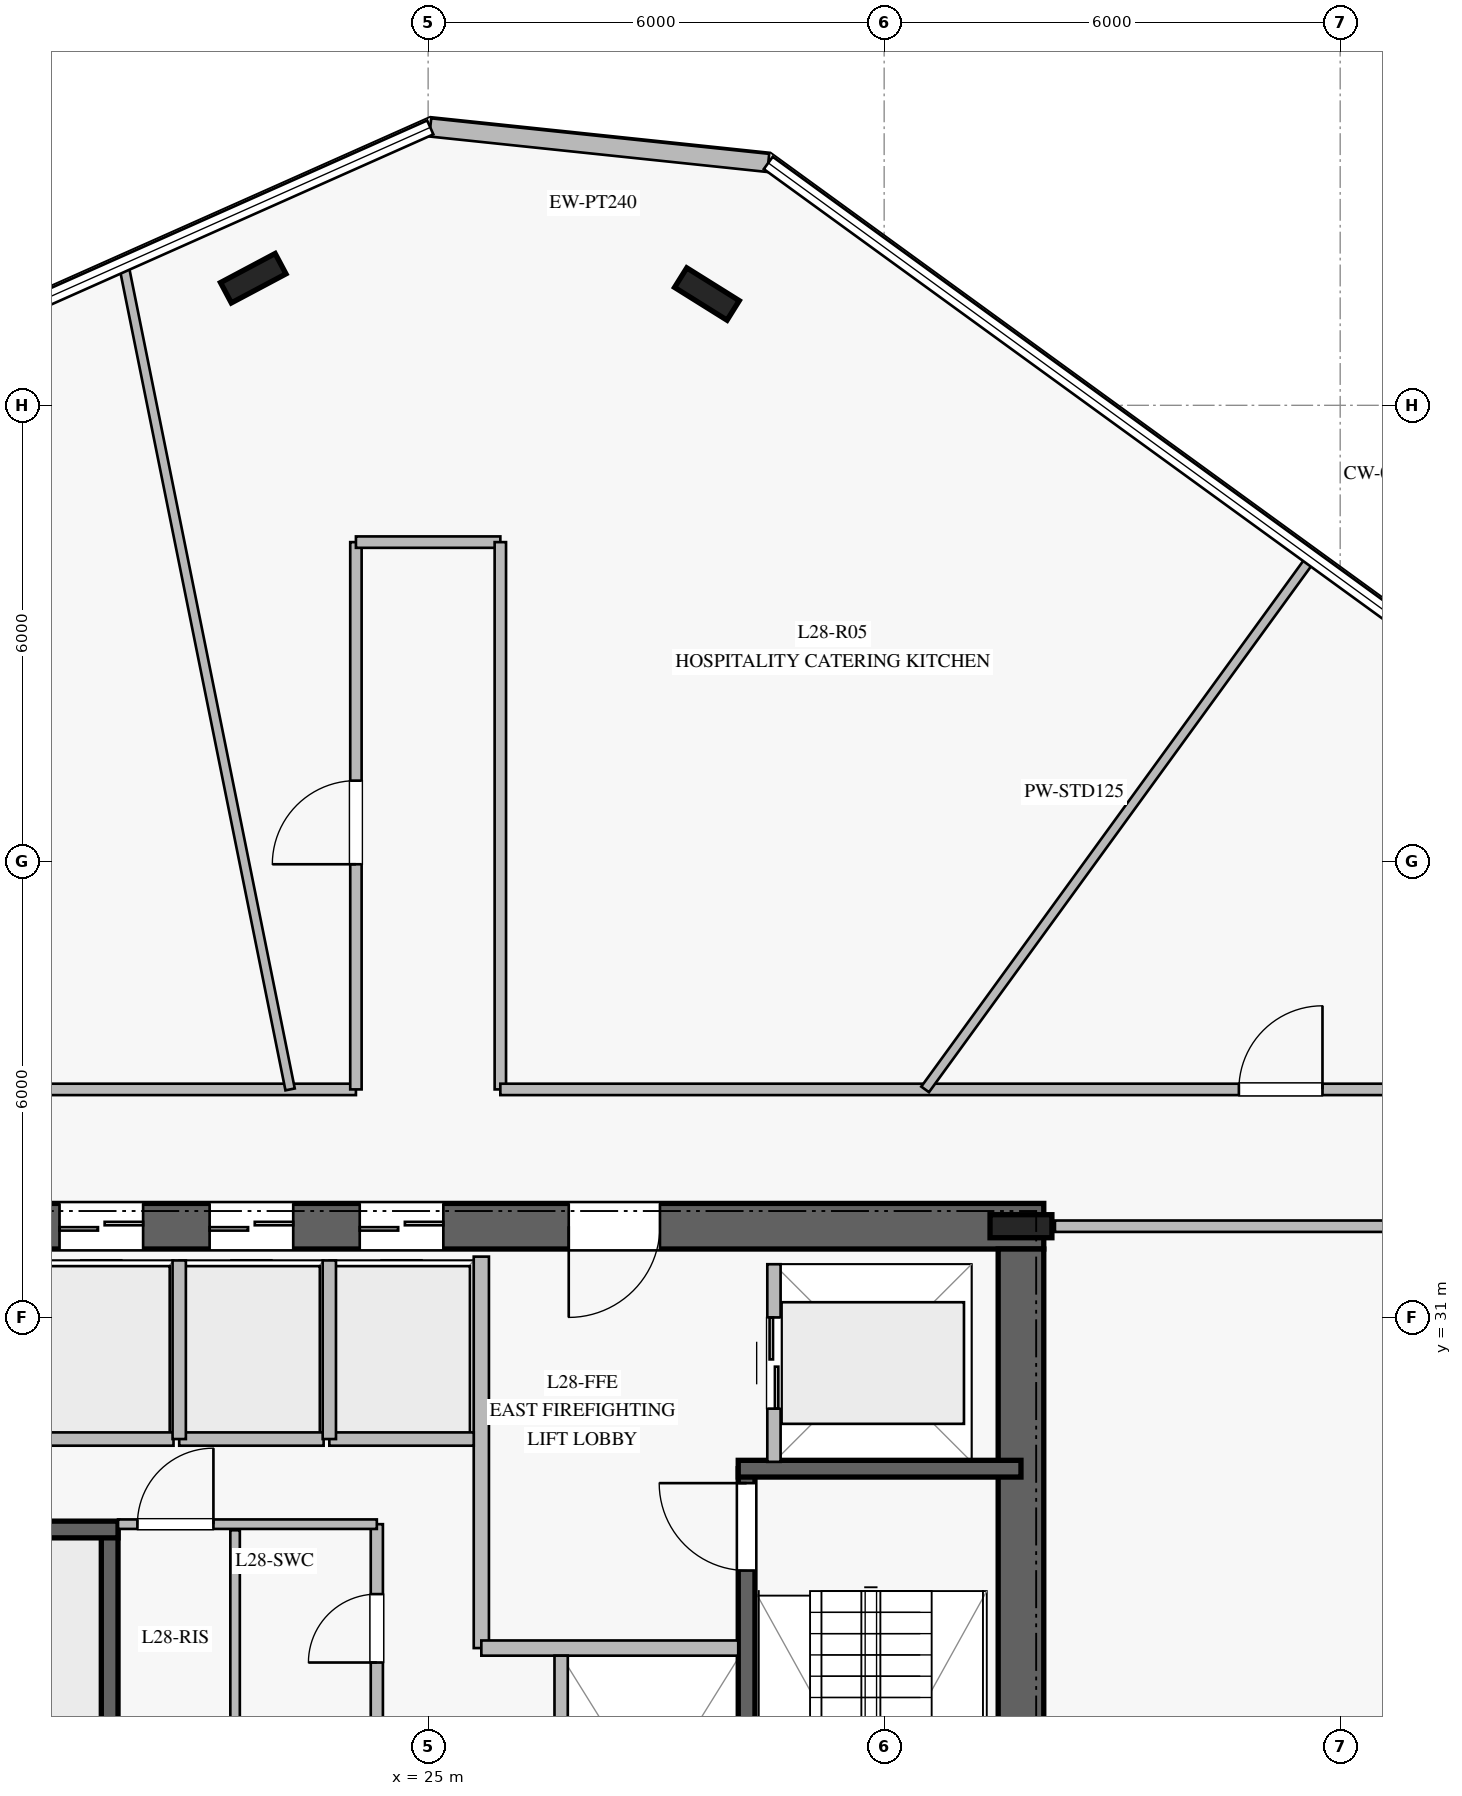
"""IFC4 building model, lengths in metres.
Left out: names, types, materials, properties, quantities, classifications, styles, units other than length and angle.
Written with IfcOpenShell. Run it as: python <this file> out.ifc"""

import sys

from ifc_helpers import new_model, si_unit, direction, frame, frame_2d, origin, origin_2d, place, context, subcontext, project, spatial, rectangle, i_section, extrude, element, fill, save


model = new_model("IFC4")
c1 = context("Model", 3, precision=1e-05, world=origin(), true_north=direction((0.0, 1.0)))
c2 = subcontext(c1, "Body", "Model", "MODEL_VIEW")
j1 = project(units=[si_unit("LENGTHUNIT", "METRE"), si_unit("PLANEANGLEUNIT", "RADIAN")], contexts=[c1])
p1 = place(None, origin())
s1 = spatial("IfcSite", under=j1, at=p1, CompositionType="ELEMENT")
p2 = place(p1, origin())
s2 = spatial("IfcBuilding", under=s1, at=p2, CompositionType="ELEMENT")
p3 = place(p2, frame((0.0, 0.0, 118.4)))
s3 = spatial("IfcBuildingStorey", under=s2, at=p3, CompositionType="ELEMENT", Elevation=118.4)
p4 = place(p3, frame((33.1, 32.2, 0.0), z_axis=(0.0, 0.0, 1.0), x_axis=(-1.0, 0.0, 0.0)))
e1 = element("IfcWall", 1, at=p4, inside=s3, PredefinedType="SHEAR", context=c2, shape_type="SweptSolid", body=[
    extrude(rectangle(XDim=16.2, YDim=0.6, at=frame_2d((8.1, 0.0))), origin(), (0.0, 0.0, 1.0), 3.76),
])
p5 = place(p4, frame((5.05, 0.0, 0.0)))
e2 = element("IfcOpeningElement", 2, at=p5, cuts=e1, PredefinedType="OPENING", context=c2, shape_type="SweptSolid", body=[
    extrude(rectangle(XDim=1.2, YDim=2.25, at=frame_2d((0.6, 1.125))), frame((0.0, 0.31, 0.0), z_axis=(0.0, -1.0, 0.0), x_axis=(1.0, 0.0, 0.0)), (0.0, 0.0, 1.0), 0.62),
])
p6 = place(p4, frame((11.85, 0.0, 0.0)))
e3 = element("IfcOpeningElement", 3, at=p6, cuts=e1, PredefinedType="OPENING", context=c2, shape_type="SweptSolid", body=[
    extrude(rectangle(XDim=1.1, YDim=2.2, at=frame_2d((0.55, 1.1))), frame((0.0, 0.31, 0.0), z_axis=(0.0, -1.0, 0.0), x_axis=(1.0, 0.0, 0.0)), (0.0, 0.0, 1.0), 0.62),
])
p7 = place(p4, frame((9.875, 0.0, 0.0)))
e4 = element("IfcOpeningElement", 4, at=p7, cuts=e1, PredefinedType="OPENING", context=c2, shape_type="SweptSolid", body=[
    extrude(rectangle(XDim=1.1, YDim=2.2, at=frame_2d((0.55, 1.1))), frame((0.0, 0.31, 0.0), z_axis=(0.0, -1.0, 0.0), x_axis=(1.0, 0.0, 0.0)), (0.0, 0.0, 1.0), 0.62),
])
p8 = place(p4, frame((7.9, 0.0, 0.0)))
e5 = element("IfcOpeningElement", 5, at=p8, cuts=e1, PredefinedType="OPENING", context=c2, shape_type="SweptSolid", body=[
    extrude(rectangle(XDim=1.1, YDim=2.2, at=frame_2d((0.55, 1.1))), frame((0.0, 0.31, 0.0), z_axis=(0.0, -1.0, 0.0), x_axis=(1.0, 0.0, 0.0)), (0.0, 0.0, 1.0), 0.62),
])
p9 = place(p3, frame((32.8, 18.1, 0.0), z_axis=(0.0, 0.0, 1.0), x_axis=(0.0, 1.0, 0.0)))
e6 = element("IfcWall", 6, at=p9, inside=s3, PredefinedType="SHEAR", context=c2, shape_type="SweptSolid", body=[
    extrude(rectangle(XDim=13.8, YDim=0.6, at=frame_2d((6.9, 0.0))), origin(), (0.0, 0.0, 1.0), 3.76),
])
p10 = place(p3, frame((32.8, 32.2, 0.0), z_axis=(0.0, 0.0, 1.0), x_axis=(1.0, 0.0, 0.0)))
e7 = element("IfcColumn", 7, at=p10, inside=s3, PredefinedType="COLUMN", context=c2, shape_type="SweptSolid", body=[
    extrude(i_section(OverallWidth=0.303, OverallDepth=0.814, WebThickness=0.021, FlangeThickness=0.04, at=origin_2d()), origin(), (0.0, 0.0, 1.0), 4.0),
])
p11 = place(p3, frame((20.81, 20.99, 0.0), z_axis=(0.0, 0.0, 1.0), x_axis=(0.0, 1.0, 0.0)))
e8 = element("IfcWall", 8, at=p11, inside=s3, PredefinedType="SOLIDWALL", context=c2, shape_type="SweptSolid", body=[
    extrude(rectangle(XDim=7.22, YDim=0.22, at=frame_2d((3.61, 0.0))), origin(), (0.0, 0.0, 1.0), 3.76),
])
p12 = place(p11, frame((0.18, 0.0, 0.0)))
e9 = element("IfcOpeningElement", 9, at=p12, cuts=e8, PredefinedType="OPENING", context=c2, shape_type="SweptSolid", body=[
    extrude(rectangle(XDim=1.15, YDim=2.2, at=frame_2d((0.575, 1.1))), frame((0.0, 0.12, 0.0), z_axis=(0.0, -1.0, 0.0), x_axis=(1.0, 0.0, 0.0)), (0.0, 0.0, 1.0), 0.24),
])
p13 = place(p3, frame((17.2, 28.21, 0.0), z_axis=(0.0, 0.0, 1.0), x_axis=(1.0, 0.0, 0.0)))
e10 = element("IfcWall", 10, at=p13, inside=s3, PredefinedType="SOLIDWALL", context=c2, shape_type="SweptSolid", body=[
    extrude(rectangle(XDim=3.72, YDim=0.22, at=frame_2d((1.86, 0.0))), origin(), (0.0, 0.0, 1.0), 3.76),
])
p14 = place(p3, frame((29.19, 21.79, 0.0), z_axis=(0.0, 0.0, 1.0), x_axis=(0.0, 1.0, 0.0)))
e11 = element("IfcWall", 11, at=p14, inside=s3, PredefinedType="SOLIDWALL", context=c2, shape_type="SweptSolid", body=[
    extrude(rectangle(XDim=7.22, YDim=0.22, at=frame_2d((3.61, 0.0))), origin(), (0.0, 0.0, 1.0), 3.76),
])
p15 = place(p14, frame((5.88, 0.0, 0.0)))
e12 = element("IfcOpeningElement", 12, at=p15, cuts=e11, PredefinedType="OPENING", context=c2, shape_type="SweptSolid", body=[
    extrude(rectangle(XDim=1.15, YDim=2.2, at=frame_2d((0.575, 1.1))), frame((0.0, 0.12, 0.0), z_axis=(0.0, -1.0, 0.0), x_axis=(1.0, 0.0, 0.0)), (0.0, 0.0, 1.0), 0.24),
])
p16 = place(p3, frame((29.08, 29.01, 0.0), z_axis=(0.0, 0.0, 1.0), x_axis=(1.0, 0.0, 0.0)))
e13 = element("IfcWall", 13, at=p16, inside=s3, PredefinedType="SOLIDWALL", context=c2, shape_type="SweptSolid", body=[
    extrude(rectangle(XDim=3.72, YDim=0.22, at=frame_2d((1.86, 0.0))), origin(), (0.0, 0.0, 1.0), 3.76),
])
for number, where, z_axis, x_axis in (
    (14, (28.668, 44.464, 0.0), (0.0, 0.0, 1.0), (-0.848, 0.53, 0.0)),
    (15, (22.699, 44.672, 0.0), (0.0, 0.0, 1.0), (0.883, 0.469, 0.0)),
):
    element("IfcColumn", number, at=place(p3, frame(where, z_axis=z_axis, x_axis=x_axis)), inside=s3, PredefinedType="COLUMN", context=c2, shape_type="SweptSolid", body=[
        extrude(i_section(OverallWidth=0.303, OverallDepth=0.814, WebThickness=0.021, FlangeThickness=0.04, at=origin_2d()), origin(), (0.0, 0.0, 1.0), 4.0),
    ])
p17 = place(p3, frame((29.475, 46.189, 0.0), z_axis=(0.0, 0.0, 1.0), x_axis=(-0.994530256506, 0.104448881729, 0.0)))
e16 = element("IfcWall", 16, at=p17, inside=s3, PredefinedType="STANDARD", context=c2, shape_type="SweptSolid", body=[
    extrude(rectangle(XDim=4.471, YDim=0.24, at=frame_2d((2.236, 0.0))), origin(), (0.0, 0.0, 1.0), 3.76),
])
p18 = place(p3, frame((25.7, 26.65, 0.0), z_axis=(0.0, 0.0, 1.0), x_axis=(0.0, 1.0, 0.0)))
e17 = element("IfcWall", 17, at=p18, inside=s3, PredefinedType="PARTITIONING", context=c2, shape_type="SweptSolid", body=[
    extrude(rectangle(XDim=5.15, YDim=0.2, at=frame_2d((2.575, 0.0))), origin(), (0.0, 0.0, 1.0), 3.76),
])
p19 = place(p3, frame((25.7, 26.65, 0.0), z_axis=(0.0, 0.0, 1.0), x_axis=(1.0, 0.0, 0.0)))
e18 = element("IfcWall", 18, at=p19, inside=s3, PredefinedType="PARTITIONING", context=c2, shape_type="SweptSolid", body=[
    extrude(rectangle(XDim=3.38, YDim=0.2, at=frame_2d((1.69, 0.0))), origin(), (0.0, 0.0, 1.0), 3.76),
])
p20 = place(p3, frame((24.325, 23.35, 0.0), z_axis=(0.0, 0.0, 1.0), x_axis=(0.0, 1.0, 0.0)))
e19 = element("IfcWall", 19, at=p20, inside=s3, PredefinedType="PLUMBINGWALL", context=c2, shape_type="SweptSolid", body=[
    extrude(rectangle(XDim=4.93, YDim=0.16, at=frame_2d((2.465, 0.0))), origin(), (0.0, 0.0, 1.0), 3.76),
])
p21 = place(p20, frame((0.65, 0.0, 0.0)))
e20 = element("IfcOpeningElement", 20, at=p21, cuts=e19, PredefinedType="OPENING", context=c2, shape_type="SweptSolid", body=[
    extrude(rectangle(XDim=0.95, YDim=2.1, at=frame_2d((0.475, 1.05))), frame((0.0, 0.09, 0.0), z_axis=(0.0, -1.0, 0.0), x_axis=(1.0, 0.0, 0.0)), (0.0, 0.0, 1.0), 0.18),
])
p22 = place(p20, frame((3.11, 0.0, 0.0)))
e21 = element("IfcOpeningElement", 21, at=p22, cuts=e19, PredefinedType="OPENING", context=c2, shape_type="SweptSolid", body=[
    extrude(rectangle(XDim=0.9, YDim=2.1, at=frame_2d((0.45, 1.05))), frame((0.0, 0.09, 0.0), z_axis=(0.0, -1.0, 0.0), x_axis=(1.0, 0.0, 0.0)), (0.0, 0.0, 1.0), 0.18),
])
p23 = place(p3, frame((20.92, 28.28, 0.0), z_axis=(0.0, 0.0, 1.0), x_axis=(1.0, 0.0, 0.0)))
e22 = element("IfcWall", 22, at=p23, inside=s3, PredefinedType="PARTITIONING", context=c2, shape_type="SweptSolid", body=[
    extrude(rectangle(XDim=3.405, YDim=0.125, at=frame_2d((1.703, 0.0))), origin(), (0.0, 0.0, 1.0), 3.76),
])
p24 = place(p23, frame((0.255, 0.0, 0.0)))
e23 = element("IfcOpeningElement", 23, at=p24, cuts=e22, PredefinedType="OPENING", context=c2, shape_type="SweptSolid", body=[
    extrude(rectangle(XDim=1.0, YDim=2.15, at=frame_2d((0.5, 1.075))), frame((0.0, 0.073, 0.0), z_axis=(0.0, -1.0, 0.0), x_axis=(1.0, 0.0, 0.0)), (0.0, 0.0, 1.0), 0.145),
])
p25 = place(p3, frame((22.46, 25.62, 0.0), z_axis=(0.0, 0.0, 1.0), x_axis=(0.0, 1.0, 0.0)))
e24 = element("IfcWall", 24, at=p25, inside=s3, PredefinedType="PARTITIONING", context=c2, shape_type="SweptSolid", body=[
    extrude(rectangle(XDim=2.58, YDim=0.125, at=frame_2d((1.29, 0.0))), origin(), (0.0, 0.0, 1.0), 3.76),
])
for number, where, z_axis, x_axis in (
    (25, (19.75, 29.4, 0.0), (0.0, 0.0, 1.0), (1.0, 0.0, 0.0)),
    (26, (21.725, 29.4, 0.0), (0.0, 0.0, 1.0), (1.0, 0.0, 0.0)),
):
    element("IfcWall", number, at=place(p3, frame(where, z_axis=z_axis, x_axis=x_axis)), inside=s3, PredefinedType="PARTITIONING", context=c2, shape_type="SweptSolid", body=[
        extrude(rectangle(XDim=1.9, YDim=0.175, at=frame_2d((0.95, 0.0))), origin(), (0.0, 0.0, 1.0), 3.76),
    ])
p26 = place(p3, frame((21.725, 29.4, 0.0), z_axis=(0.0, 0.0, 1.0), x_axis=(0.0, 1.0, 0.0)))
e27 = element("IfcWall", 27, at=p26, inside=s3, PredefinedType="PARTITIONING", context=c2, shape_type="SweptSolid", body=[
    extrude(rectangle(XDim=2.35, YDim=0.175, at=frame_2d((1.175, 0.0))), origin(), (0.0, 0.0, 1.0), 3.76),
])
p27 = place(p3, frame((23.7, 29.4, 0.0), z_axis=(0.0, 0.0, 1.0), x_axis=(1.0, 0.0, 0.0)))
e28 = element("IfcWall", 28, at=p27, inside=s3, PredefinedType="PARTITIONING", context=c2, shape_type="SweptSolid", body=[
    extrude(rectangle(XDim=1.9, YDim=0.175, at=frame_2d((0.95, 0.0))), origin(), (0.0, 0.0, 1.0), 3.76),
])
p28 = place(p3, frame((23.7, 29.4, 0.0), z_axis=(0.0, 0.0, 1.0), x_axis=(0.0, 1.0, 0.0)))
e29 = element("IfcWall", 29, at=p28, inside=s3, PredefinedType="PARTITIONING", context=c2, shape_type="SweptSolid", body=[
    extrude(rectangle(XDim=2.35, YDim=0.175, at=frame_2d((1.175, 0.0))), origin(), (0.0, 0.0, 1.0), 3.76),
])
p29 = place(p3, frame((26.75, 24.65, 0.0), z_axis=(0.0, 0.0, 1.0), x_axis=(0.0, 1.0, 0.0)))
e30 = element("IfcWall", 30, at=p29, inside=s3, PredefinedType="PARTITIONING", context=c2, shape_type="SweptSolid", body=[
    extrude(rectangle(XDim=1.9, YDim=0.175, at=frame_2d((0.95, 0.0))), origin(), (0.0, 0.0, 1.0), 3.76),
])
p30 = place(p3, frame((29.55, 29.1, 0.0), z_axis=(0.0, 0.0, 1.0), x_axis=(0.0, 1.0, 0.0)))
e31 = element("IfcWall", 31, at=p30, inside=s3, PredefinedType="PARTITIONING", context=c2, shape_type="SweptSolid", body=[
    extrude(rectangle(XDim=2.6, YDim=0.175, at=frame_2d((1.3, 0.0))), origin(), (0.0, 0.0, 1.0), 3.76),
])
p31 = place(p30, frame((0.7, 0.0, 0.0)))
e32 = element("IfcOpeningElement", 32, at=p31, cuts=e31, PredefinedType="OPENING", context=c2, shape_type="SweptSolid", body=[
    extrude(rectangle(XDim=1.2, YDim=2.2, at=frame_2d((0.6, 1.1))), frame((0.0, 0.098, 0.0), z_axis=(0.0, -1.0, 0.0), x_axis=(1.0, 0.0, 0.0)), (0.0, 0.0, 1.0), 0.195),
])
p32 = place(p3, frame((17.2, 34.0, 0.0), z_axis=(0.0, 0.0, 1.0), x_axis=(1.0, 0.0, 0.0)))
e33 = element("IfcWall", 33, at=p32, inside=s3, PredefinedType="PARTITIONING", context=c2, shape_type="SweptSolid", body=[
    extrude(rectangle(XDim=6.85, YDim=0.15, at=frame_2d((3.425, 0.0))), origin(), (0.0, 0.0, 1.0), 3.21),
])
p33 = place(p3, frame((24.05, 34.0, 0.0), z_axis=(0.0, 0.0, 1.0), x_axis=(0.0, 1.0, 0.0)))
e34 = element("IfcWall", 34, at=p33, inside=s3, PredefinedType="PARTITIONING", context=c2, shape_type="SweptSolid", body=[
    extrude(rectangle(XDim=7.2, YDim=0.15, at=frame_2d((3.6, 0.0))), origin(), (0.0, 0.0, 1.0), 3.36),
])
p34 = place(p33, frame((2.962, 0.0, 0.0)))
e35 = element("IfcOpeningElement", 35, at=p34, cuts=e34, PredefinedType="OPENING", context=c2, shape_type="SweptSolid", body=[
    extrude(rectangle(XDim=1.1, YDim=2.2, at=frame_2d((0.55, 1.1))), frame((0.0, 0.085, 0.0), z_axis=(0.0, -1.0, 0.0), x_axis=(1.0, 0.0, 0.0)), (0.0, 0.0, 1.0), 0.17),
])
p35 = place(p3, frame((24.05, 41.2, 0.0), z_axis=(0.0, 0.0, 1.0), x_axis=(1.0, 0.0, 0.0)))
e36 = element("IfcWall", 36, at=p35, inside=s3, PredefinedType="PARTITIONING", context=c2, shape_type="SweptSolid", body=[
    extrude(rectangle(XDim=1.9, YDim=0.15, at=frame_2d((0.95, 0.0))), origin(), (0.0, 0.0, 1.0), 3.76),
])
p36 = place(p3, frame((25.95, 41.2, 0.0), z_axis=(0.0, 0.0, 1.0), x_axis=(0.0, -1.0, 0.0)))
e37 = element("IfcWall", 37, at=p36, inside=s3, PredefinedType="PARTITIONING", context=c2, shape_type="SweptSolid", body=[
    extrude(rectangle(XDim=7.2, YDim=0.15, at=frame_2d((3.6, 0.0))), origin(), (0.0, 0.0, 1.0), 3.36),
])
p37 = place(p3, frame((25.95, 34.0, 0.0), z_axis=(0.0, 0.0, 1.0), x_axis=(1.0, 0.0, 0.0)))
e38 = element("IfcWall", 38, at=p37, inside=s3, PredefinedType="PARTITIONING", context=c2, shape_type="SweptSolid", body=[
    extrude(rectangle(XDim=15.25, YDim=0.15, at=frame_2d((7.625, 0.0))), origin(), (0.0, 0.0, 1.0), 3.21),
])
p38 = place(p37, frame((9.717, 0.0, 0.0)))
e39 = element("IfcOpeningElement", 39, at=p38, cuts=e38, PredefinedType="OPENING", context=c2, shape_type="SweptSolid", body=[
    extrude(rectangle(XDim=1.1, YDim=2.2, at=frame_2d((0.55, 1.1))), frame((0.0, 0.085, 0.0), z_axis=(0.0, -1.0, 0.0), x_axis=(1.0, 0.0, 0.0)), (0.0, 0.0, 1.0), 0.17),
])
p39 = place(p3, frame((41.2, 32.2, 0.0), z_axis=(0.0, 0.0, 1.0), x_axis=(-1.0, 0.0, 0.0)))
e40 = element("IfcWall", 40, at=p39, inside=s3, PredefinedType="PARTITIONING", context=c2, shape_type="SweptSolid", body=[
    extrude(rectangle(XDim=7.953, YDim=0.15, at=frame_2d((3.977, 0.0))), origin(), (0.0, 0.0, 1.0), 3.21),
])
p40 = place(p3, frame((31.539, 34.0, 0.0), z_axis=(0.0, 0.0, 1.0), x_axis=(0.587810002797, 0.808999011502, 0.0)))
e41 = element("IfcWall", 41, at=p40, inside=s3, PredefinedType="PARTITIONING", context=c2, shape_type="SweptSolid", body=[
    extrude(rectangle(XDim=8.63, YDim=0.125, at=frame_2d((4.315, 0.0))), origin(), (0.0, 0.0, 1.0), 3.05),
])
p41 = place(p3, frame((23.184, 34.0, 0.0), z_axis=(0.0, 0.0, 1.0), x_axis=(-0.197818005652, 0.980238765118, 0.0)))
e42 = element("IfcWall", 42, at=p41, inside=s3, PredefinedType="PARTITIONING", context=c2, shape_type="SweptSolid", body=[
    extrude(rectangle(XDim=11.061, YDim=0.125, at=frame_2d((5.53, 0.0))), origin(), (0.0, 0.0, 1.0), 3.16),
])
p42 = place(p15, origin())
e43 = element("IfcDoor", 43, at=p42, inside=s3, OperationType="SINGLE_SWING_RIGHT", PredefinedType="DOOR", context=c2, shape_type="SweptSolid", body=[
    extrude(rectangle(XDim=1.15, YDim=2.2, at=frame_2d((0.575, 1.1))), frame((0.0, 0.025, 0.0), z_axis=(0.0, -1.0, 0.0), x_axis=(1.0, 0.0, 0.0)), (0.0, 0.0, 1.0), 0.05),
])
fill(e12, e43)
p43 = place(p5, origin())
e44 = element("IfcDoor", 44, at=p43, inside=s3, OperationType="SINGLE_SWING_RIGHT", PredefinedType="DOOR", context=c2, shape_type="SweptSolid", body=[
    extrude(rectangle(XDim=1.2, YDim=2.25, at=frame_2d((0.6, 1.125))), frame((0.0, 0.025, 0.0), z_axis=(0.0, -1.0, 0.0), x_axis=(1.0, 0.0, 0.0)), (0.0, 0.0, 1.0), 0.05),
])
fill(e2, e44)
p44 = place(p24, origin())
e45 = element("IfcDoor", 45, at=p44, inside=s3, OperationType="SINGLE_SWING_RIGHT", PredefinedType="DOOR", context=c2, shape_type="SweptSolid", body=[
    extrude(rectangle(XDim=1.0, YDim=2.15, at=frame_2d((0.5, 1.075))), frame((0.0, 0.025, 0.0), z_axis=(0.0, -1.0, 0.0), x_axis=(1.0, 0.0, 0.0)), (0.0, 0.0, 1.0), 0.05),
])
fill(e23, e45)
p45 = place(p22, origin())
e46 = element("IfcDoor", 46, at=p45, inside=s3, OperationType="SINGLE_SWING_LEFT", PredefinedType="DOOR", context=c2, shape_type="SweptSolid", body=[
    extrude(rectangle(XDim=0.9, YDim=2.1, at=frame_2d((0.45, 1.05))), frame((0.0, 0.025, 0.0), z_axis=(0.0, -1.0, 0.0), x_axis=(1.0, 0.0, 0.0)), (0.0, 0.0, 1.0), 0.05),
])
fill(e21, e46)
p46 = place(p6, origin())
e47 = element("IfcDoor", 47, at=p46, inside=s3, OperationType="DOUBLE_DOOR_SLIDING", PredefinedType="DOOR", context=c2, shape_type="SweptSolid", body=[
    extrude(rectangle(XDim=1.1, YDim=2.2, at=frame_2d((0.55, 1.1))), frame((0.0, 0.025, 0.0), z_axis=(0.0, -1.0, 0.0), x_axis=(1.0, 0.0, 0.0)), (0.0, 0.0, 1.0), 0.05),
])
fill(e3, e47)
p47 = place(p7, origin())
e48 = element("IfcDoor", 48, at=p47, inside=s3, OperationType="DOUBLE_DOOR_SLIDING", PredefinedType="DOOR", context=c2, shape_type="SweptSolid", body=[
    extrude(rectangle(XDim=1.1, YDim=2.2, at=frame_2d((0.55, 1.1))), frame((0.0, 0.025, 0.0), z_axis=(0.0, -1.0, 0.0), x_axis=(1.0, 0.0, 0.0)), (0.0, 0.0, 1.0), 0.05),
])
fill(e4, e48)
p48 = place(p8, origin())
e49 = element("IfcDoor", 49, at=p48, inside=s3, OperationType="DOUBLE_DOOR_SLIDING", PredefinedType="DOOR", context=c2, shape_type="SweptSolid", body=[
    extrude(rectangle(XDim=1.1, YDim=2.2, at=frame_2d((0.55, 1.1))), frame((0.0, 0.025, 0.0), z_axis=(0.0, -1.0, 0.0), x_axis=(1.0, 0.0, 0.0)), (0.0, 0.0, 1.0), 0.05),
])
fill(e5, e49)
p49 = place(p31, origin())
e50 = element("IfcDoor", 50, at=p49, inside=s3, OperationType="DOUBLE_DOOR_SLIDING", PredefinedType="DOOR", context=c2, shape_type="SweptSolid", body=[
    extrude(rectangle(XDim=1.2, YDim=2.2, at=frame_2d((0.6, 1.1))), frame((0.0, 0.025, 0.0), z_axis=(0.0, -1.0, 0.0), x_axis=(1.0, 0.0, 0.0)), (0.0, 0.0, 1.0), 0.05),
])
fill(e32, e50)
p50 = place(p38, origin())
e51 = element("IfcDoor", 51, at=p50, inside=s3, OperationType="SINGLE_SWING_RIGHT", PredefinedType="DOOR", context=c2, shape_type="SweptSolid", body=[
    extrude(rectangle(XDim=1.1, YDim=2.2, at=frame_2d((0.55, 1.1))), frame((0.0, 0.025, 0.0), z_axis=(0.0, -1.0, 0.0), x_axis=(1.0, 0.0, 0.0)), (0.0, 0.0, 1.0), 0.05),
])
fill(e39, e51)
p51 = place(p34, origin())
e52 = element("IfcDoor", 52, at=p51, inside=s3, OperationType="SINGLE_SWING_LEFT", PredefinedType="DOOR", context=c2, shape_type="SweptSolid", body=[
    extrude(rectangle(XDim=1.1, YDim=2.2, at=frame_2d((0.55, 1.1))), frame((0.0, 0.025, 0.0), z_axis=(0.0, -1.0, 0.0), x_axis=(1.0, 0.0, 0.0)), (0.0, 0.0, 1.0), 0.05),
])
fill(e35, e52)
save(model, sys.argv[1])
